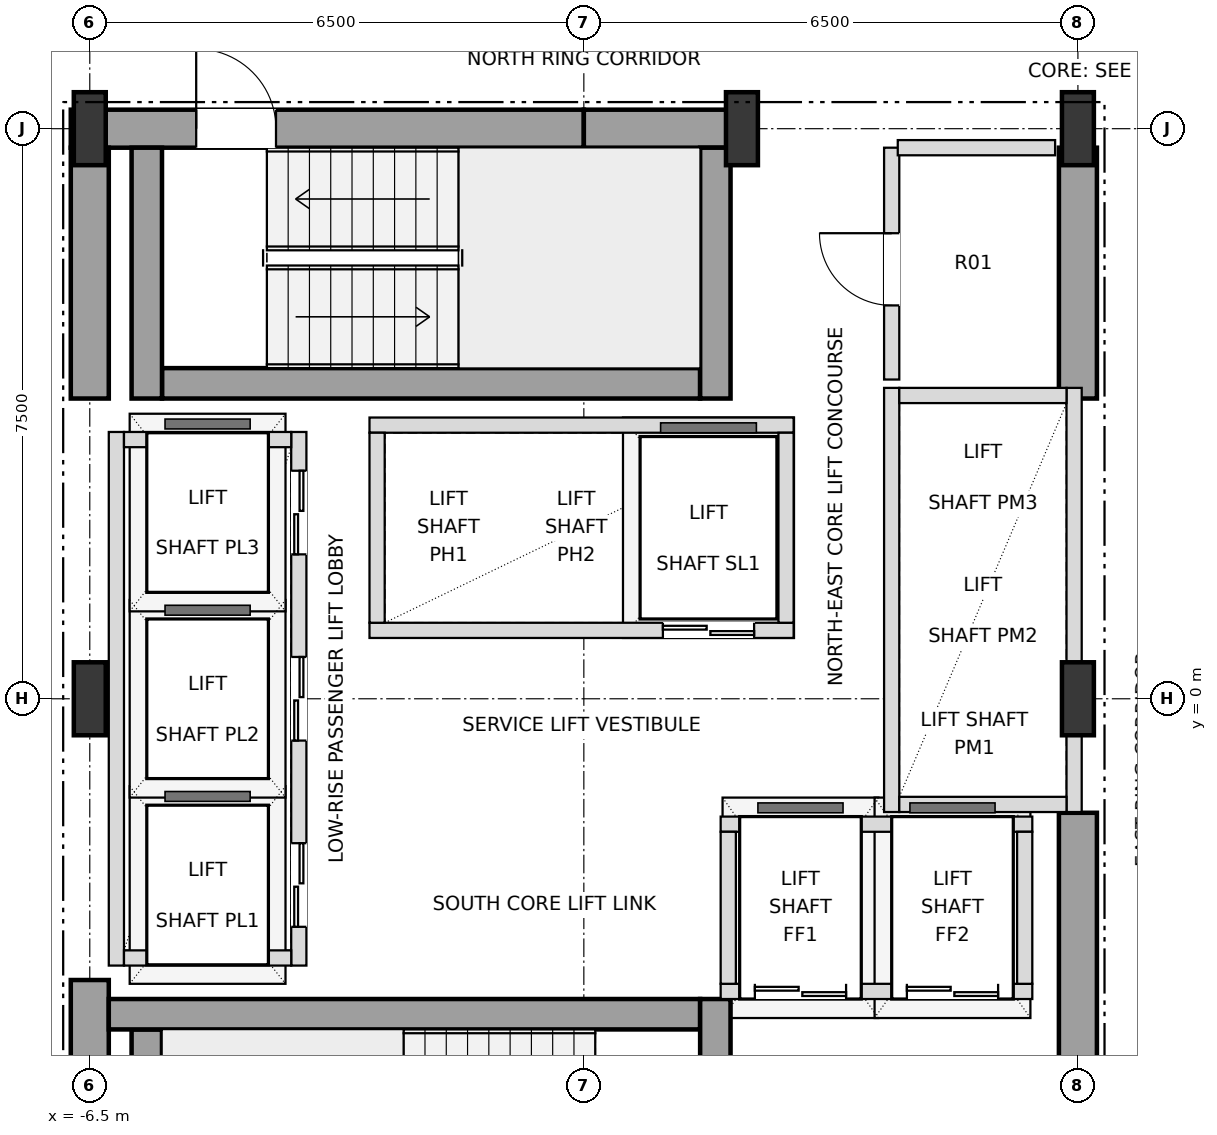
"""IFC4 building model, lengths in metres.
Left out: names, types, materials, properties, quantities, classifications, styles, units other than length and angle.
Written with IfcOpenShell. Run it as: python <this file> out.ifc"""

import sys

from ifc_helpers import new_model, si_unit, direction, frame, frame_2d, origin, origin_2d, place, context, subcontext, project, spatial, rectangle, i_section, extrude, element, fill, save


model = new_model("IFC4")
c1 = context("Model", 3, precision=1e-05, world=origin(), true_north=direction((0.0, 1.0)))
c2 = subcontext(c1, "Body", "Model", "MODEL_VIEW")
j1 = project(units=[si_unit("LENGTHUNIT", "METRE"), si_unit("PLANEANGLEUNIT", "RADIAN")], contexts=[c1])
p1 = place(None, origin())
s1 = spatial("IfcSite", under=j1, at=p1, CompositionType="ELEMENT")
p2 = place(p1, origin())
s2 = spatial("IfcBuilding", under=s1, at=p2, CompositionType="ELEMENT")
p3 = place(p2, frame((0.0, 0.0, 79.2)))
s3 = spatial("IfcBuildingStorey", under=s2, at=p3, CompositionType="ELEMENT", Elevation=79.2)
for number, where, z_axis, x_axis in (
    (1, (-6.5, 0.0, 0.0), (0.0, 0.0, 1.0), (1.0, 0.0, 0.0)),
    (2, (6.5, 0.0, 0.0), (0.0, 0.0, 1.0), (1.0, 0.0, 0.0)),
    (3, (-6.5, 7.5, 0.0), (0.0, 0.0, 1.0), (1.0, 0.0, 0.0)),
    (4, (2.08, 7.5, 0.0), (0.0, 0.0, 1.0), (1.0, 0.0, 0.0)),
    (5, (6.5, 7.5, 0.0), (0.0, 0.0, 1.0), (1.0, 0.0, 0.0)),
):
    element("IfcColumn", number, at=place(p3, frame(where, z_axis=z_axis, x_axis=x_axis)), inside=s3, PredefinedType="COLUMN", context=c2, shape_type="SweptSolid", body=[
        extrude(i_section(OverallWidth=0.42, OverallDepth=0.96, WebThickness=0.022, FlangeThickness=0.034, at=origin_2d()), origin(), (0.0, 0.0, 1.0), 3.6),
    ])
p4 = place(p3, frame((-6.75, 7.5, 0.0), z_axis=(0.0, 0.0, 1.0), x_axis=(1.0, 0.0, 0.0)))
e6 = element("IfcWall", 6, at=p4, inside=s3, PredefinedType="SHEAR", context=c2, shape_type="SweptSolid", body=[
    extrude(rectangle(XDim=6.75, YDim=0.5, at=frame_2d((3.375, 0.0))), origin(), (0.0, 0.0, 1.0), 3.38),
])
p5 = place(p4, frame((1.65, 0.0, 0.0)))
e7 = element("IfcOpeningElement", 7, at=p5, cuts=e6, PredefinedType="OPENING", context=c2, shape_type="SweptSolid", body=[
    extrude(rectangle(XDim=1.05, YDim=2.15, at=frame_2d((0.525, 1.075))), frame((0.0, 0.26, 0.0), z_axis=(0.0, -1.0, 0.0), x_axis=(1.0, 0.0, 0.0)), (0.0, 0.0, 1.0), 0.52),
])
p6 = place(p3, frame((0.0, 7.5, 0.0), z_axis=(0.0, 0.0, 1.0), x_axis=(1.0, 0.0, 0.0)))
e8 = element("IfcWall", 8, at=p6, inside=s3, PredefinedType="SHEAR", context=c2, shape_type="SweptSolid", body=[
    extrude(rectangle(XDim=2.08, YDim=0.5, at=frame_2d((1.04, 0.0))), origin(), (0.0, 0.0, 1.0), 3.38),
])
p7 = place(p3, frame((-6.5, -7.25, 0.0), z_axis=(0.0, 0.0, 1.0), x_axis=(0.0, 1.0, 0.0)))
e9 = element("IfcWall", 9, at=p7, inside=s3, PredefinedType="SHEAR", context=c2, shape_type="SweptSolid", body=[
    extrude(rectangle(XDim=3.55, YDim=0.5, at=frame_2d((1.775, 0.0))), origin(), (0.0, 0.0, 1.0), 3.38),
])
p8 = place(p3, frame((-6.5, 3.95, 0.0), z_axis=(0.0, 0.0, 1.0), x_axis=(0.0, 1.0, 0.0)))
e10 = element("IfcWall", 10, at=p8, inside=s3, PredefinedType="SHEAR", context=c2, shape_type="SweptSolid", body=[
    extrude(rectangle(XDim=3.3, YDim=0.5, at=frame_2d((1.65, 0.0))), origin(), (0.0, 0.0, 1.0), 3.38),
])
p9 = place(p3, frame((6.5, -7.25, 0.0), z_axis=(0.0, 0.0, 1.0), x_axis=(0.0, 1.0, 0.0)))
e11 = element("IfcWall", 11, at=p9, inside=s3, PredefinedType="SHEAR", context=c2, shape_type="SweptSolid", body=[
    extrude(rectangle(XDim=5.75, YDim=0.5, at=frame_2d((2.875, 0.0))), origin(), (0.0, 0.0, 1.0), 3.38),
])
p10 = place(p9, frame((0.85, 0.0, 0.0)))
e12 = element("IfcOpeningElement", 12, at=p10, cuts=e11, PredefinedType="OPENING", context=c2, shape_type="SweptSolid", body=[
    extrude(rectangle(XDim=1.05, YDim=2.15, at=frame_2d((0.525, 1.075))), frame((0.0, 0.26, 0.0), z_axis=(0.0, -1.0, 0.0), x_axis=(1.0, 0.0, 0.0)), (0.0, 0.0, 1.0), 0.52),
])
p11 = place(p3, frame((6.5, 3.95, 0.0), z_axis=(0.0, 0.0, 1.0), x_axis=(0.0, 1.0, 0.0)))
e13 = element("IfcWall", 13, at=p11, inside=s3, PredefinedType="SHEAR", context=c2, shape_type="SweptSolid", body=[
    extrude(rectangle(XDim=3.3, YDim=0.5, at=frame_2d((1.65, 0.0))), origin(), (0.0, 0.0, 1.0), 3.38),
])
p12 = place(p3, frame((-5.75, -7.25, 0.0), z_axis=(0.0, 0.0, 1.0), x_axis=(0.0, 1.0, 0.0)))
e14 = element("IfcWall", 14, at=p12, inside=s3, PredefinedType="SHEAR", context=c2, shape_type="SweptSolid", body=[
    extrude(rectangle(XDim=2.9, YDim=0.4, at=frame_2d((1.45, 0.0))), origin(), (0.0, 0.0, 1.0), 3.38),
])
p13 = place(p3, frame((-6.25, -4.15, 0.0), z_axis=(0.0, 0.0, 1.0), x_axis=(1.0, 0.0, 0.0)))
e15 = element("IfcWall", 15, at=p13, inside=s3, PredefinedType="SHEAR", context=c2, shape_type="SweptSolid", body=[
    extrude(rectangle(XDim=7.78, YDim=0.4, at=frame_2d((3.89, 0.0))), origin(), (0.0, 0.0, 1.0), 3.38),
])
p14 = place(p3, frame((1.73, -7.25, 0.0), z_axis=(0.0, 0.0, 1.0), x_axis=(0.0, 1.0, 0.0)))
e16 = element("IfcWall", 16, at=p14, inside=s3, PredefinedType="SHEAR", context=c2, shape_type="SweptSolid", body=[
    extrude(rectangle(XDim=3.3, YDim=0.4, at=frame_2d((1.65, 0.0))), origin(), (0.0, 0.0, 1.0), 3.38),
])
p15 = place(p14, frame((0.9, 0.0, 0.0)))
e17 = element("IfcOpeningElement", 17, at=p15, cuts=e16, PredefinedType="OPENING", context=c2, shape_type="SweptSolid", body=[
    extrude(rectangle(XDim=1.05, YDim=2.15, at=frame_2d((0.525, 1.075))), frame((0.0, 0.21, 0.0), z_axis=(0.0, -1.0, 0.0), x_axis=(1.0, 0.0, 0.0)), (0.0, 0.0, 1.0), 0.42),
])
p16 = place(p3, frame((-5.55, 4.15, 0.0), z_axis=(0.0, 0.0, 1.0), x_axis=(1.0, 0.0, 0.0)))
e18 = element("IfcWall", 18, at=p16, inside=s3, PredefinedType="SHEAR", context=c2, shape_type="SweptSolid", body=[
    extrude(rectangle(XDim=7.08, YDim=0.4, at=frame_2d((3.54, 0.0))), origin(), (0.0, 0.0, 1.0), 3.38),
])
for number, where, z_axis, x_axis in (
    (19, (1.73, 3.95, 0.0), (0.0, 0.0, 1.0), (0.0, 1.0, 0.0)),
    (20, (-5.75, 3.95, 0.0), (0.0, 0.0, 1.0), (0.0, 1.0, 0.0)),
):
    element("IfcWall", number, at=place(p3, frame(where, z_axis=z_axis, x_axis=x_axis)), inside=s3, PredefinedType="SHEAR", context=c2, shape_type="SweptSolid", body=[
        extrude(rectangle(XDim=3.3, YDim=0.4, at=frame_2d((1.65, 0.0))), origin(), (0.0, 0.0, 1.0), 3.38),
    ])
p17 = place(p3, frame((-3.75, -3.51, 0.0), z_axis=(0.0, 0.0, 1.0), x_axis=(0.0, 1.0, 0.0)))
e21 = element("IfcWall", 21, at=p17, inside=s3, PredefinedType="SOLIDWALL", context=c2, shape_type="SweptSolid", body=[
    extrude(rectangle(XDim=7.02, YDim=0.2, at=frame_2d((3.51, 0.0))), origin(), (0.0, 0.0, 1.0), 3.38),
])
p18 = place(p17, frame((0.51, 0.0, 0.0)))
e22 = element("IfcOpeningElement", 22, at=p18, cuts=e21, PredefinedType="OPENING", context=c2, shape_type="SweptSolid", body=[
    extrude(rectangle(XDim=1.1, YDim=2.15, at=frame_2d((0.55, 1.075))), frame((0.0, 0.11, 0.0), z_axis=(0.0, -1.0, 0.0), x_axis=(1.0, 0.0, 0.0)), (0.0, 0.0, 1.0), 0.22),
])
p19 = place(p17, frame((2.96, 0.0, 0.0)))
e23 = element("IfcOpeningElement", 23, at=p19, cuts=e21, PredefinedType="OPENING", context=c2, shape_type="SweptSolid", body=[
    extrude(rectangle(XDim=1.1, YDim=2.15, at=frame_2d((0.55, 1.075))), frame((0.0, 0.11, 0.0), z_axis=(0.0, -1.0, 0.0), x_axis=(1.0, 0.0, 0.0)), (0.0, 0.0, 1.0), 0.22),
])
p20 = place(p17, frame((5.41, 0.0, 0.0)))
e24 = element("IfcOpeningElement", 24, at=p20, cuts=e21, PredefinedType="OPENING", context=c2, shape_type="SweptSolid", body=[
    extrude(rectangle(XDim=1.1, YDim=2.15, at=frame_2d((0.55, 1.075))), frame((0.0, 0.11, 0.0), z_axis=(0.0, -1.0, 0.0), x_axis=(1.0, 0.0, 0.0)), (0.0, 0.0, 1.0), 0.22),
])
p21 = place(p3, frame((-6.15, -3.51, 0.0), z_axis=(0.0, 0.0, 1.0), x_axis=(0.0, 1.0, 0.0)))
e25 = element("IfcWall", 25, at=p21, inside=s3, PredefinedType="SOLIDWALL", context=c2, shape_type="SweptSolid", body=[
    extrude(rectangle(XDim=7.02, YDim=0.2, at=frame_2d((3.51, 0.0))), origin(), (0.0, 0.0, 1.0), 3.38),
])
for number, where, z_axis, x_axis in (
    (26, (-6.05, -3.41, 0.0), (0.0, 0.0, 1.0), (1.0, 0.0, 0.0)),
    (27, (-6.05, 3.41, 0.0), (0.0, 0.0, 1.0), (1.0, 0.0, 0.0)),
):
    element("IfcWall", number, at=place(p3, frame(where, z_axis=z_axis, x_axis=x_axis)), inside=s3, PredefinedType="SOLIDWALL", context=c2, shape_type="SweptSolid", body=[
        extrude(rectangle(XDim=2.2, YDim=0.2, at=frame_2d((1.1, 0.0))), origin(), (0.0, 0.0, 1.0), 3.38),
    ])
p22 = place(p3, frame((4.05, -1.49, 0.0), z_axis=(0.0, 0.0, 1.0), x_axis=(0.0, 1.0, 0.0)))
e28 = element("IfcWall", 28, at=p22, inside=s3, PredefinedType="SOLIDWALL", context=c2, shape_type="SweptSolid", body=[
    extrude(rectangle(XDim=5.58, YDim=0.2, at=frame_2d((2.79, 0.0))), origin(), (0.0, 0.0, 1.0), 3.38),
])
p23 = place(p3, frame((6.45, -1.49, 0.0), z_axis=(0.0, 0.0, 1.0), x_axis=(0.0, 1.0, 0.0)))
e29 = element("IfcWall", 29, at=p23, inside=s3, PredefinedType="SOLIDWALL", context=c2, shape_type="SweptSolid", body=[
    extrude(rectangle(XDim=5.58, YDim=0.2, at=frame_2d((2.79, 0.0))), origin(), (0.0, 0.0, 1.0), 2.816),
])
for number, where, z_axis, x_axis in (
    (30, (4.15, -1.39, 0.0), (0.0, 0.0, 1.0), (1.0, 0.0, 0.0)),
    (31, (4.15, 3.99, 0.0), (0.0, 0.0, 1.0), (1.0, 0.0, 0.0)),
):
    element("IfcWall", number, at=place(p3, frame(where, z_axis=z_axis, x_axis=x_axis)), inside=s3, PredefinedType="SOLIDWALL", context=c2, shape_type="SweptSolid", body=[
        extrude(rectangle(XDim=2.2, YDim=0.2, at=frame_2d((1.1, 0.0))), origin(), (0.0, 0.0, 1.0), 3.38),
    ])
p24 = place(p3, frame((-2.82, 0.9, 0.0), z_axis=(0.0, 0.0, 1.0), x_axis=(1.0, 0.0, 0.0)))
e32 = element("IfcWall", 32, at=p24, inside=s3, PredefinedType="SOLIDWALL", context=c2, shape_type="SweptSolid", body=[
    extrude(rectangle(XDim=5.58, YDim=0.2, at=frame_2d((2.79, 0.0))), origin(), (0.0, 0.0, 1.0), 3.38),
])
p25 = place(p24, frame((3.86, 0.0, 0.0)))
e33 = element("IfcOpeningElement", 33, at=p25, cuts=e32, PredefinedType="OPENING", context=c2, shape_type="SweptSolid", body=[
    extrude(rectangle(XDim=1.2, YDim=2.2, at=frame_2d((0.6, 1.1))), frame((0.0, 0.11, 0.0), z_axis=(0.0, -1.0, 0.0), x_axis=(1.0, 0.0, 0.0)), (0.0, 0.0, 1.0), 0.22),
])
p26 = place(p3, frame((-2.82, 3.6, 0.0), z_axis=(0.0, 0.0, 1.0), x_axis=(1.0, 0.0, 0.0)))
e34 = element("IfcWall", 34, at=p26, inside=s3, PredefinedType="SOLIDWALL", context=c2, shape_type="SweptSolid", body=[
    extrude(rectangle(XDim=5.58, YDim=0.2, at=frame_2d((2.79, 0.0))), origin(), (0.0, 0.0, 1.0), 3.38),
])
for number, where, z_axis, x_axis in (
    (35, (-2.72, 1.0, 0.0), (0.0, 0.0, 1.0), (0.0, 1.0, 0.0)),
    (36, (2.66, 1.0, 0.0), (0.0, 0.0, 1.0), (0.0, 1.0, 0.0)),
):
    element("IfcWall", number, at=place(p3, frame(where, z_axis=z_axis, x_axis=x_axis)), inside=s3, PredefinedType="SOLIDWALL", context=c2, shape_type="SweptSolid", body=[
        extrude(rectangle(XDim=2.5, YDim=0.2, at=frame_2d((1.25, 0.0))), origin(), (0.0, 0.0, 1.0), 3.38),
    ])
p27 = place(p3, frame((1.8, -3.85, 0.0), z_axis=(0.0, 0.0, 1.0), x_axis=(1.0, 0.0, 0.0)))
e37 = element("IfcWall", 37, at=p27, inside=s3, PredefinedType="SOLIDWALL", context=c2, shape_type="SweptSolid", body=[
    extrude(rectangle(XDim=4.1, YDim=0.2, at=frame_2d((2.05, 0.0))), origin(), (0.0, 0.0, 1.0), 3.38),
])
p28 = place(p27, frame((0.45, 0.0, 0.0)))
e38 = element("IfcOpeningElement", 38, at=p28, cuts=e37, PredefinedType="OPENING", context=c2, shape_type="SweptSolid", body=[
    extrude(rectangle(XDim=1.2, YDim=2.2, at=frame_2d((0.6, 1.1))), frame((0.0, 0.11, 0.0), z_axis=(0.0, -1.0, 0.0), x_axis=(1.0, 0.0, 0.0)), (0.0, 0.0, 1.0), 0.22),
])
p29 = place(p27, frame((2.45, 0.0, 0.0)))
e39 = element("IfcOpeningElement", 39, at=p29, cuts=e37, PredefinedType="OPENING", context=c2, shape_type="SweptSolid", body=[
    extrude(rectangle(XDim=1.2, YDim=2.2, at=frame_2d((0.6, 1.1))), frame((0.0, 0.11, 0.0), z_axis=(0.0, -1.0, 0.0), x_axis=(1.0, 0.0, 0.0)), (0.0, 0.0, 1.0), 0.22),
])
p30 = place(p3, frame((1.8, -1.65, 0.0), z_axis=(0.0, 0.0, 1.0), x_axis=(1.0, 0.0, 0.0)))
e40 = element("IfcWall", 40, at=p30, inside=s3, PredefinedType="SOLIDWALL", context=c2, shape_type="SweptSolid", body=[
    extrude(rectangle(XDim=4.1, YDim=0.2, at=frame_2d((2.05, 0.0))), origin(), (0.0, 0.0, 1.0), 3.38),
])
for number, where, z_axis, x_axis in (
    (41, (1.9, -3.75, 0.0), (0.0, 0.0, 1.0), (0.0, 1.0, 0.0)),
    (42, (5.8, -3.75, 0.0), (0.0, 0.0, 1.0), (0.0, 1.0, 0.0)),
):
    element("IfcWall", number, at=place(p3, frame(where, z_axis=z_axis, x_axis=x_axis)), inside=s3, PredefinedType="SOLIDWALL", context=c2, shape_type="SweptSolid", body=[
        extrude(rectangle(XDim=2.0, YDim=0.2, at=frame_2d((1.0, 0.0))), origin(), (0.0, 0.0, 1.0), 3.38),
    ])
p31 = place(p3, frame((4.05, 4.2, 0.0), z_axis=(0.0, 0.0, 1.0), x_axis=(0.0, 1.0, 0.0)))
e43 = element("IfcWall", 43, at=p31, inside=s3, PredefinedType="SOLIDWALL", context=c2, shape_type="SweptSolid", body=[
    extrude(rectangle(XDim=3.05, YDim=0.2, at=frame_2d((1.525, 0.0))), origin(), (0.0, 0.0, 1.0), 3.38),
])
p32 = place(p31, frame((0.975, 0.0, 0.0)))
e44 = element("IfcOpeningElement", 44, at=p32, cuts=e43, PredefinedType="OPENING", context=c2, shape_type="SweptSolid", body=[
    extrude(rectangle(XDim=0.95, YDim=2.15, at=frame_2d((0.475, 1.075))), frame((0.0, 0.11, 0.0), z_axis=(0.0, -1.0, 0.0), x_axis=(1.0, 0.0, 0.0)), (0.0, 0.0, 1.0), 0.22),
])
p33 = place(p3, frame((4.13, 7.25, 0.0), z_axis=(0.0, 0.0, 1.0), x_axis=(1.0, 0.0, 0.0)))
e45 = element("IfcWall", 45, at=p33, inside=s3, PredefinedType="SOLIDWALL", context=c2, shape_type="SweptSolid", body=[
    extrude(rectangle(XDim=2.07, YDim=0.2, at=frame_2d((1.035, 0.0))), origin(), (0.0, 0.0, 1.0), 3.38),
])
p34 = place(p5, origin())
e46 = element("IfcDoor", 46, at=p34, inside=s3, OperationType="SINGLE_SWING_LEFT", PredefinedType="DOOR", context=c2, shape_type="SweptSolid", body=[
    extrude(rectangle(XDim=1.05, YDim=2.15, at=frame_2d((0.525, 1.075))), frame((0.0, 0.025, 0.0), z_axis=(0.0, -1.0, 0.0), x_axis=(1.0, 0.0, 0.0)), (0.0, 0.0, 1.0), 0.05),
])
fill(e7, e46)
p35 = place(p18, origin())
e47 = element("IfcDoor", 47, at=p35, inside=s3, OperationType="DOUBLE_DOOR_SLIDING", PredefinedType="DOOR", context=c2, shape_type="SweptSolid", body=[
    extrude(rectangle(XDim=1.1, YDim=2.15, at=frame_2d((0.55, 1.075))), frame((0.0, 0.025, 0.0), z_axis=(0.0, -1.0, 0.0), x_axis=(1.0, 0.0, 0.0)), (0.0, 0.0, 1.0), 0.05),
])
fill(e22, e47)
p36 = place(p19, origin())
e48 = element("IfcDoor", 48, at=p36, inside=s3, OperationType="DOUBLE_DOOR_SLIDING", PredefinedType="DOOR", context=c2, shape_type="SweptSolid", body=[
    extrude(rectangle(XDim=1.1, YDim=2.15, at=frame_2d((0.55, 1.075))), frame((0.0, 0.025, 0.0), z_axis=(0.0, -1.0, 0.0), x_axis=(1.0, 0.0, 0.0)), (0.0, 0.0, 1.0), 0.05),
])
fill(e23, e48)
p37 = place(p20, origin())
e49 = element("IfcDoor", 49, at=p37, inside=s3, OperationType="DOUBLE_DOOR_SLIDING", PredefinedType="DOOR", context=c2, shape_type="SweptSolid", body=[
    extrude(rectangle(XDim=1.1, YDim=2.15, at=frame_2d((0.55, 1.075))), frame((0.0, 0.025, 0.0), z_axis=(0.0, -1.0, 0.0), x_axis=(1.0, 0.0, 0.0)), (0.0, 0.0, 1.0), 0.05),
])
fill(e24, e49)
p38 = place(p25, origin())
e50 = element("IfcDoor", 50, at=p38, inside=s3, OperationType="DOUBLE_DOOR_SLIDING", PredefinedType="DOOR", context=c2, shape_type="SweptSolid", body=[
    extrude(rectangle(XDim=1.2, YDim=2.2, at=frame_2d((0.6, 1.1))), frame((0.0, 0.025, 0.0), z_axis=(0.0, -1.0, 0.0), x_axis=(1.0, 0.0, 0.0)), (0.0, 0.0, 1.0), 0.05),
])
fill(e33, e50)
p39 = place(p28, origin())
e51 = element("IfcDoor", 51, at=p39, inside=s3, OperationType="DOUBLE_DOOR_SLIDING", PredefinedType="DOOR", context=c2, shape_type="SweptSolid", body=[
    extrude(rectangle(XDim=1.2, YDim=2.2, at=frame_2d((0.6, 1.1))), frame((0.0, 0.025, 0.0), z_axis=(0.0, -1.0, 0.0), x_axis=(1.0, 0.0, 0.0)), (0.0, 0.0, 1.0), 0.05),
])
fill(e38, e51)
p40 = place(p29, origin())
e52 = element("IfcDoor", 52, at=p40, inside=s3, OperationType="DOUBLE_DOOR_SLIDING", PredefinedType="DOOR", context=c2, shape_type="SweptSolid", body=[
    extrude(rectangle(XDim=1.2, YDim=2.2, at=frame_2d((0.6, 1.1))), frame((0.0, 0.025, 0.0), z_axis=(0.0, -1.0, 0.0), x_axis=(1.0, 0.0, 0.0)), (0.0, 0.0, 1.0), 0.05),
])
fill(e39, e52)
p41 = place(p32, origin())
e53 = element("IfcDoor", 53, at=p41, inside=s3, OperationType="SINGLE_SWING_RIGHT", PredefinedType="DOOR", context=c2, shape_type="SweptSolid", body=[
    extrude(rectangle(XDim=0.95, YDim=2.15, at=frame_2d((0.475, 1.075))), frame((0.0, 0.025, 0.0), z_axis=(0.0, -1.0, 0.0), x_axis=(1.0, 0.0, 0.0)), (0.0, 0.0, 1.0), 0.05),
])
fill(e44, e53)
save(model, sys.argv[1])
